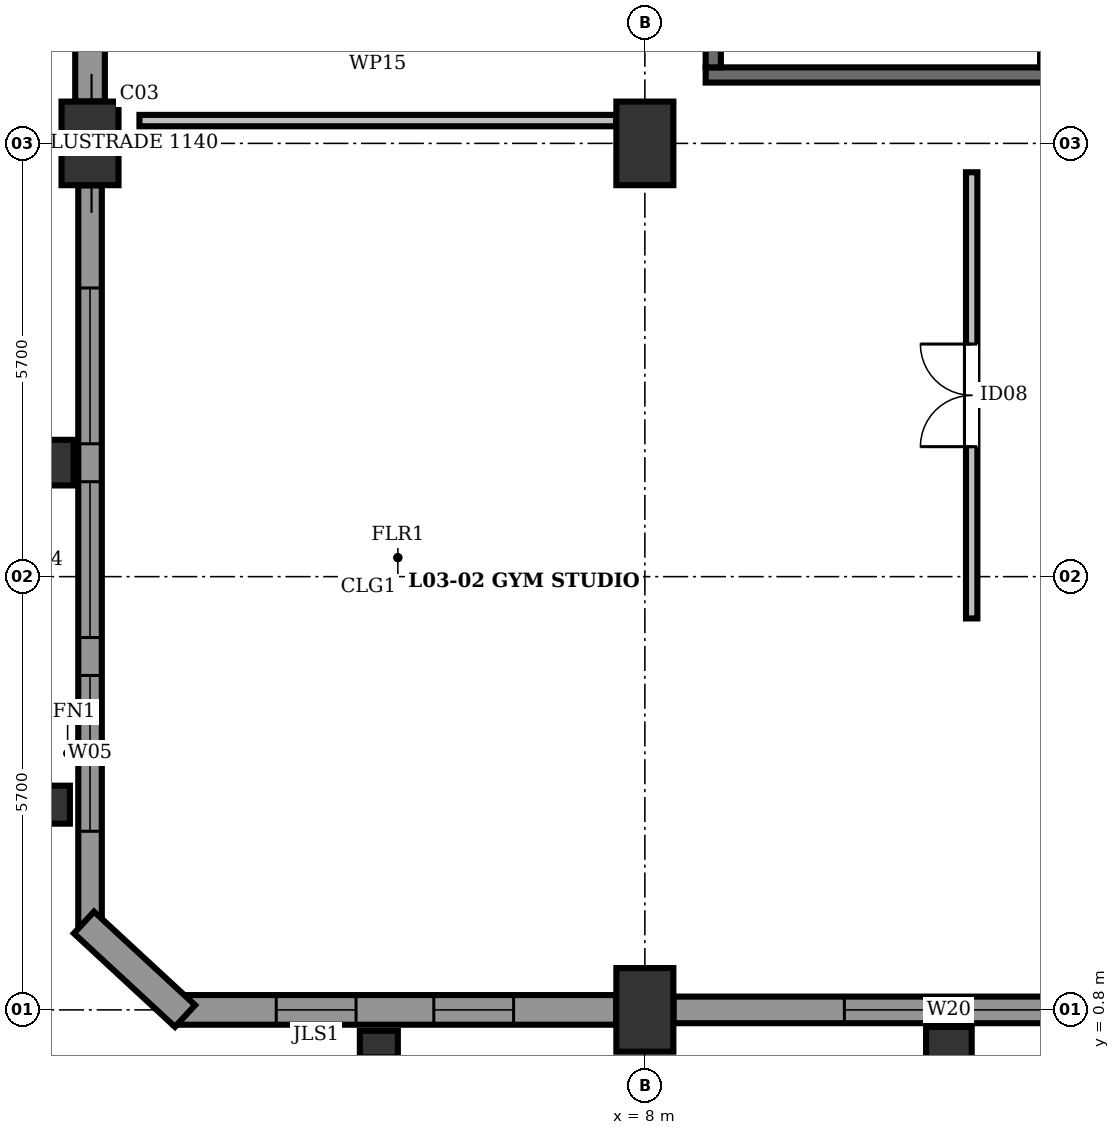
"""IFC4 building model, lengths in metres.
Left out: names, types, materials, properties, quantities, classifications, styles, units other than length and angle.
Written with IfcOpenShell. Run it as: python <this file> out.ifc"""

import sys

from ifc_helpers import new_model, si_unit, direction, frame, frame_2d, origin, origin_2d, place, context, subcontext, project, spatial, rectangle, extrude, element, fill, save


model = new_model("IFC4")
c1 = context("Model", 3, precision=1e-05, world=origin(), true_north=direction((0.0, 1.0)))
c2 = subcontext(c1, "Body", "Model", "MODEL_VIEW")
j1 = project(units=[si_unit("LENGTHUNIT", "METRE"), si_unit("PLANEANGLEUNIT", "RADIAN")], contexts=[c1])
p1 = place(None, origin())
s1 = spatial("IfcSite", under=j1, at=p1, CompositionType="ELEMENT")
p2 = place(p1, origin())
s2 = spatial("IfcBuilding", under=s1, at=p2, CompositionType="ELEMENT")
p3 = place(p2, frame((0.0, 0.0, 14.7)))
s3 = spatial("IfcBuildingStorey", under=s2, at=p3, CompositionType="ELEMENT", Elevation=14.7)
for number, where, z_axis, x_axis in (
    (1, (0.7, 12.2, 0.0), (0.0, 0.0, 1.0), (1.0, 0.0, 0.0)),
    (2, (8.0, 0.8, 0.0), (0.0, 0.0, 1.0), (1.0, 0.0, 0.0)),
    (3, (8.0, 12.2, 0.0), (0.0, 0.0, 1.0), (1.0, 0.0, 0.0)),
):
    element("IfcColumn", number, at=place(p3, frame(where, z_axis=z_axis, x_axis=x_axis)), inside=s3, PredefinedType="COLUMN", context=c2, shape_type="SweptSolid", body=[
        extrude(rectangle(XDim=0.75, YDim=1.1, at=origin_2d()), origin(), (0.0, 0.0, 1.0), 4.5),
    ])
p4 = place(p3, frame((0.26, 3.5, 0.0), z_axis=(0.0, 0.0, 1.0), x_axis=(1.0, 0.0, 0.0)))
e4 = element("IfcColumn", 4, at=p4, inside=s3, PredefinedType="PILASTER", context=c2, shape_type="SweptSolid", body=[
    extrude(rectangle(XDim=0.35, YDim=0.5, at=origin_2d()), origin(), (0.0, 0.0, 1.0), 4.5),
])
p5 = place(p3, frame((0.26, 8.0, 0.0), z_axis=(0.0, 0.0, 1.0), x_axis=(1.0, 0.0, 0.0)))
e5 = element("IfcColumn", 5, at=p5, inside=s3, PredefinedType="PILASTER", context=c2, shape_type="SweptSolid", body=[
    extrude(rectangle(XDim=0.45, YDim=0.6, at=origin_2d()), origin(), (0.0, 0.0, 1.0), 4.5),
])
p6 = place(p3, frame((4.5, 0.35, 0.0), z_axis=(0.0, 0.0, 1.0), x_axis=(0.0, 1.0, 0.0)))
e6 = element("IfcColumn", 6, at=p6, inside=s3, PredefinedType="PILASTER", context=c2, shape_type="SweptSolid", body=[
    extrude(rectangle(XDim=0.35, YDim=0.5, at=origin_2d()), origin(), (0.0, 0.0, 1.0), 4.5),
])
p7 = place(p3, frame((12.0, 0.35, 0.0), z_axis=(0.0, 0.0, 1.0), x_axis=(0.0, 1.0, 0.0)))
e7 = element("IfcColumn", 7, at=p7, inside=s3, PredefinedType="PILASTER", context=c2, shape_type="SweptSolid", body=[
    extrude(rectangle(XDim=0.45, YDim=0.6, at=origin_2d()), origin(), (0.0, 0.0, 1.0), 4.5),
])
p8 = place(p3, frame((0.7, 1.8, 0.0), z_axis=(0.0, 0.0, 1.0), x_axis=(0.0, 1.0, 0.0)))
e8 = element("IfcWall", 8, at=p8, inside=s3, PredefinedType="STANDARD", context=c2, shape_type="SweptSolid", body=[
    extrude(rectangle(XDim=9.848, YDim=0.31, at=frame_2d((4.924, 0.0))), origin(), (0.0, 0.0, 1.0), 4.2),
])
p9 = place(p8, frame((1.35, 0.0, 0.75)))
e9 = element("IfcOpeningElement", 9, at=p9, cuts=e8, PredefinedType="OPENING", context=c2, shape_type="SweptSolid", body=[
    extrude(rectangle(XDim=2.05, YDim=1.75, at=frame_2d((1.025, 0.875))), frame((0.0, 0.167, 0.0), z_axis=(0.0, -1.0, 0.0), x_axis=(1.0, 0.0, 0.0)), (0.0, 0.0, 1.0), 0.334),
])
p10 = place(p8, frame((3.899, 0.0, 0.75)))
e10 = element("IfcOpeningElement", 10, at=p10, cuts=e8, PredefinedType="OPENING", context=c2, shape_type="SweptSolid", body=[
    extrude(rectangle(XDim=2.05, YDim=1.75, at=frame_2d((1.025, 0.875))), frame((0.0, 0.167, 0.0), z_axis=(0.0, -1.0, 0.0), x_axis=(1.0, 0.0, 0.0)), (0.0, 0.0, 1.0), 0.334),
])
p11 = place(p8, frame((6.448, 0.0, 0.75)))
e11 = element("IfcOpeningElement", 11, at=p11, cuts=e8, PredefinedType="OPENING", context=c2, shape_type="SweptSolid", body=[
    extrude(rectangle(XDim=2.05, YDim=1.75, at=frame_2d((1.025, 0.875))), frame((0.0, 0.167, 0.0), z_axis=(0.0, -1.0, 0.0), x_axis=(1.0, 0.0, 0.0)), (0.0, 0.0, 1.0), 0.334),
])
p12 = place(p3, frame((0.7, 12.752, 0.0), z_axis=(0.0, 0.0, 1.0), x_axis=(0.0, 1.0, 0.0)))
e12 = element("IfcWall", 12, at=p12, inside=s3, PredefinedType="STANDARD", context=c2, shape_type="SweptSolid", body=[
    extrude(rectangle(XDim=10.296, YDim=0.39, at=frame_2d((5.148, 0.0))), origin(), (0.0, 0.0, 1.0), 3.712),
])
p13 = place(p12, frame((1.35, 0.0, 0.75)))
e13 = element("IfcOpeningElement", 13, at=p13, cuts=e12, PredefinedType="OPENING", context=c2, shape_type="SweptSolid", body=[
    extrude(rectangle(XDim=1.5, YDim=2.05, at=frame_2d((0.75, 1.025))), frame((0.0, 0.207, 0.0), z_axis=(0.0, -1.0, 0.0), x_axis=(1.0, 0.0, 0.0)), (0.0, 0.0, 1.0), 0.414),
])
p14 = place(p12, frame((4.398, 0.0, 0.75)))
e14 = element("IfcOpeningElement", 14, at=p14, cuts=e12, PredefinedType="OPENING", context=c2, shape_type="SweptSolid", body=[
    extrude(rectangle(XDim=1.5, YDim=2.05, at=frame_2d((0.75, 1.025))), frame((0.0, 0.207, 0.0), z_axis=(0.0, -1.0, 0.0), x_axis=(1.0, 0.0, 0.0)), (0.0, 0.0, 1.0), 0.414),
])
p15 = place(p12, frame((7.446, 0.0, 0.75)))
e15 = element("IfcOpeningElement", 15, at=p15, cuts=e12, PredefinedType="OPENING", context=c2, shape_type="SweptSolid", body=[
    extrude(rectangle(XDim=1.5, YDim=2.05, at=frame_2d((0.75, 1.025))), frame((0.0, 0.207, 0.0), z_axis=(0.0, -1.0, 0.0), x_axis=(1.0, 0.0, 0.0)), (0.0, 0.0, 1.0), 0.414),
])
p16 = place(p3, frame((1.8, 0.8, 0.0), z_axis=(0.0, 0.0, 1.0), x_axis=(1.0, 0.0, 0.0)))
e16 = element("IfcWall", 16, at=p16, inside=s3, PredefinedType="STANDARD", context=c2, shape_type="SweptSolid", body=[
    extrude(rectangle(XDim=5.823, YDim=0.39, at=frame_2d((2.912, 0.0))), origin(), (0.0, 0.0, 1.0), 4.2),
])
p17 = place(p16, frame((1.35, 0.0, 0.75)))
e17 = element("IfcOpeningElement", 17, at=p17, cuts=e16, PredefinedType="OPENING", context=c2, shape_type="SweptSolid", body=[
    extrude(rectangle(XDim=1.05, YDim=2.35, at=frame_2d((0.525, 1.175))), frame((0.0, 0.207, 0.0), z_axis=(0.0, -1.0, 0.0), x_axis=(1.0, 0.0, 0.0)), (0.0, 0.0, 1.0), 0.414),
])
p18 = place(p16, frame((3.423, 0.0, 0.75)))
e18 = element("IfcOpeningElement", 18, at=p18, cuts=e16, PredefinedType="OPENING", context=c2, shape_type="SweptSolid", body=[
    extrude(rectangle(XDim=1.05, YDim=2.35, at=frame_2d((0.525, 1.175))), frame((0.0, 0.207, 0.0), z_axis=(0.0, -1.0, 0.0), x_axis=(1.0, 0.0, 0.0)), (0.0, 0.0, 1.0), 0.414),
])
p19 = place(p3, frame((8.377, 0.8, 0.0), z_axis=(0.0, 0.0, 1.0), x_axis=(1.0, 0.0, 0.0)))
e19 = element("IfcWall", 19, at=p19, inside=s3, PredefinedType="STANDARD", context=c2, shape_type="SweptSolid", body=[
    extrude(rectangle(XDim=7.246, YDim=0.35, at=frame_2d((3.623, 0.0))), origin(), (0.0, 0.0, 1.0), 3.712),
])
p20 = place(p19, frame((2.248, 0.0, 0.75)))
e20 = element("IfcOpeningElement", 20, at=p20, cuts=e19, PredefinedType="OPENING", context=c2, shape_type="SweptSolid", body=[
    extrude(rectangle(XDim=2.75, YDim=2.35, at=frame_2d((1.375, 1.175))), frame((0.0, 0.187, 0.0), z_axis=(0.0, -1.0, 0.0), x_axis=(1.0, 0.0, 0.0)), (0.0, 0.0, 1.0), 0.374),
])
p21 = place(p3, frame((0.62, 1.95, 0.0), z_axis=(0.0, 0.0, 1.0), x_axis=(0.734131351327, -0.679007480812, 0.0)))
e21 = element("IfcWall", 21, at=p21, inside=s3, PredefinedType="STANDARD", context=c2, shape_type="SweptSolid", body=[
    extrude(rectangle(XDim=1.812, YDim=0.39, at=frame_2d((0.906, 0.0))), origin(), (0.0, 0.0, 1.0), 4.2),
])
p22 = place(p3, frame((8.8, 13.1, 0.0), z_axis=(0.0, 0.0, 1.0), x_axis=(1.0, 0.0, 0.0)))
e22 = element("IfcWall", 22, at=p22, inside=s3, PredefinedType="SOLIDWALL", context=c2, shape_type="SweptSolid", body=[
    extrude(rectangle(XDim=4.6, YDim=0.2, at=frame_2d((2.3, 0.0))), origin(), (0.0, 0.0, 1.0), 4.26),
])
p23 = place(p3, frame((8.9, 13.2, 0.0), z_axis=(0.0, 0.0, 1.0), x_axis=(0.0, 1.0, 0.0)))
e23 = element("IfcWall", 23, at=p23, inside=s3, PredefinedType="SOLIDWALL", context=c2, shape_type="SweptSolid", body=[
    extrude(rectangle(XDim=8.8, YDim=0.2, at=frame_2d((4.4, 0.0))), origin(), (0.0, 0.0, 1.0), 4.26),
])
p24 = place(p3, frame((12.3, 5.95, 0.0), z_axis=(0.0, 0.0, 1.0), x_axis=(0.0, 1.0, 0.0)))
e24 = element("IfcWall", 24, at=p24, inside=s3, PredefinedType="PARTITIONING", context=c2, shape_type="SweptSolid", body=[
    extrude(rectangle(XDim=5.87, YDim=0.15, at=frame_2d((2.935, 0.0))), origin(), (0.0, 0.0, 1.0), 3.345),
])
p25 = place(p24, frame((2.26, 0.0, 0.0)))
e25 = element("IfcOpeningElement", 25, at=p25, cuts=e24, PredefinedType="OPENING", context=c2, shape_type="SweptSolid", body=[
    extrude(rectangle(XDim=1.35, YDim=2.2, at=frame_2d((0.675, 1.1))), frame((0.0, 0.087, 0.0), z_axis=(0.0, -1.0, 0.0), x_axis=(1.0, 0.0, 0.0)), (0.0, 0.0, 1.0), 0.174),
])
p26 = place(p3, frame((1.35, 12.5, 0.0), z_axis=(0.0, 0.0, 1.0), x_axis=(1.0, 0.0, 0.0)))
e26 = element("IfcWall", 26, at=p26, inside=s3, PredefinedType="PARTITIONING", context=c2, shape_type="SweptSolid", body=[
    extrude(rectangle(XDim=6.273, YDim=0.15, at=frame_2d((3.136, 0.0))), origin(), (0.0, 0.0, 1.0), 3.345),
])
p27 = place(p9, origin())
e27 = element("IfcWindow", 27, at=p27, inside=s3, PartitioningType="TRIPLE_PANEL_VERTICAL", PredefinedType="WINDOW", context=c2, shape_type="SweptSolid", body=[
    extrude(rectangle(XDim=2.05, YDim=1.75, at=frame_2d((1.025, 0.875))), frame((0.0, 0.08, 0.0), z_axis=(0.0, -1.0, 0.0), x_axis=(1.0, 0.0, 0.0)), (0.0, 0.0, 1.0), 0.06),
])
fill(e9, e27)
p28 = place(p10, origin())
e28 = element("IfcWindow", 28, at=p28, inside=s3, PartitioningType="TRIPLE_PANEL_VERTICAL", PredefinedType="WINDOW", context=c2, shape_type="SweptSolid", body=[
    extrude(rectangle(XDim=2.05, YDim=1.75, at=frame_2d((1.025, 0.875))), frame((0.0, 0.08, 0.0), z_axis=(0.0, -1.0, 0.0), x_axis=(1.0, 0.0, 0.0)), (0.0, 0.0, 1.0), 0.06),
])
fill(e10, e28)
p29 = place(p11, origin())
e29 = element("IfcWindow", 29, at=p29, inside=s3, PartitioningType="TRIPLE_PANEL_VERTICAL", PredefinedType="WINDOW", context=c2, shape_type="SweptSolid", body=[
    extrude(rectangle(XDim=2.05, YDim=1.75, at=frame_2d((1.025, 0.875))), frame((0.0, 0.08, 0.0), z_axis=(0.0, -1.0, 0.0), x_axis=(1.0, 0.0, 0.0)), (0.0, 0.0, 1.0), 0.06),
])
fill(e11, e29)
p30 = place(p17, origin())
e30 = element("IfcWindow", 30, at=p30, inside=s3, PartitioningType="SINGLE_PANEL", PredefinedType="WINDOW", context=c2, shape_type="SweptSolid", body=[
    extrude(rectangle(XDim=1.05, YDim=2.35, at=frame_2d((0.525, 1.175))), frame((0.0, 0.08, 0.0), z_axis=(0.0, -1.0, 0.0), x_axis=(1.0, 0.0, 0.0)), (0.0, 0.0, 1.0), 0.06),
])
fill(e17, e30)
p31 = place(p18, origin())
e31 = element("IfcWindow", 31, at=p31, inside=s3, PartitioningType="SINGLE_PANEL", PredefinedType="WINDOW", context=c2, shape_type="SweptSolid", body=[
    extrude(rectangle(XDim=1.05, YDim=2.35, at=frame_2d((0.525, 1.175))), frame((0.0, 0.08, 0.0), z_axis=(0.0, -1.0, 0.0), x_axis=(1.0, 0.0, 0.0)), (0.0, 0.0, 1.0), 0.06),
])
fill(e18, e31)
p32 = place(p20, origin())
e32 = element("IfcWindow", 32, at=p32, inside=s3, PartitioningType="TRIPLE_PANEL_VERTICAL", PredefinedType="WINDOW", context=c2, shape_type="SweptSolid", body=[
    extrude(rectangle(XDim=2.75, YDim=2.35, at=frame_2d((1.375, 1.175))), frame((0.0, 0.08, 0.0), z_axis=(0.0, -1.0, 0.0), x_axis=(1.0, 0.0, 0.0)), (0.0, 0.0, 1.0), 0.06),
])
fill(e20, e32)
p33 = place(p25, origin())
e33 = element("IfcDoor", 33, at=p33, inside=s3, OperationType="DOUBLE_DOOR_SINGLE_SWING", PredefinedType="DOOR", context=c2, shape_type="SweptSolid", body=[
    extrude(rectangle(XDim=1.35, YDim=2.2, at=frame_2d((0.675, 1.1))), frame((0.0, 0.025, 0.0), z_axis=(0.0, -1.0, 0.0), x_axis=(1.0, 0.0, 0.0)), (0.0, 0.0, 1.0), 0.05),
])
fill(e25, e33)
save(model, sys.argv[1])
